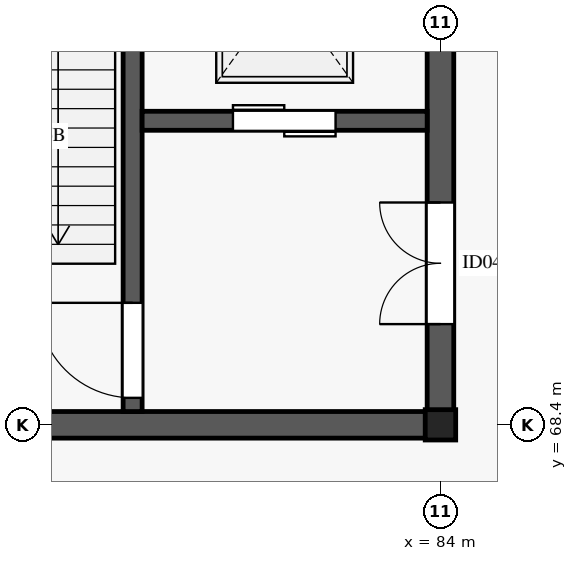
"""IFC4 building model, lengths in metres.
Left out: names, types, materials, properties, quantities, classifications, styles, units other than length and angle.
Written with IfcOpenShell. Run it as: python <this file> out.ifc"""

import sys

from ifc_helpers import new_model, si_unit, direction, frame, frame_2d, origin, origin_2d, place, context, subcontext, project, spatial, rectangle, i_section, extrude, element, fill, save


model = new_model("IFC4")
c1 = context("Model", 3, precision=1e-05, world=origin(), true_north=direction((0.0, 1.0)))
c2 = subcontext(c1, "Body", "Model", "MODEL_VIEW")
j1 = project(units=[si_unit("LENGTHUNIT", "METRE"), si_unit("PLANEANGLEUNIT", "RADIAN")], contexts=[c1])
p1 = place(None, origin())
s1 = spatial("IfcSite", under=j1, at=p1, CompositionType="ELEMENT")
p2 = place(p1, origin())
s2 = spatial("IfcBuilding", under=s1, at=p2, CompositionType="ELEMENT")
p3 = place(p2, frame((0.0, 0.0, -4.8)))
s3 = spatial("IfcBuildingStorey", under=s2, at=p3, CompositionType="ELEMENT", Elevation=-4.8)
p4 = place(p3, frame((84.0, 68.4, 0.0), z_axis=(0.0, 0.0, 1.0), x_axis=(1.0, 0.0, 0.0)))
e1 = element("IfcColumn", 1, at=p4, inside=s3, PredefinedType="COLUMN", context=c2, shape_type="SweptSolid", body=[
    extrude(i_section(OverallWidth=0.401, OverallDepth=0.399, WebThickness=0.025, FlangeThickness=0.04, FilletRadius=0.015, at=origin_2d()), origin(), (0.0, 0.0, 1.0), 4.58),
])
p5 = place(p3, frame((75.825, 68.4, 0.0), z_axis=(0.0, 0.0, 1.0), x_axis=(1.0, 0.0, 0.0)))
e2 = element("IfcWall", 2, at=p5, inside=s3, PredefinedType="SHEAR", context=c2, shape_type="SweptSolid", body=[
    extrude(rectangle(XDim=8.35, YDim=0.35, at=frame_2d((4.175, 0.0))), origin(), (0.0, 0.0, 1.0), 4.59),
])
p6 = place(p3, frame((84.0, 68.575, 0.0), z_axis=(0.0, 0.0, 1.0), x_axis=(0.0, 1.0, 0.0)))
e3 = element("IfcWall", 3, at=p6, inside=s3, PredefinedType="SHEAR", context=c2, shape_type="SweptSolid", body=[
    extrude(rectangle(XDim=7.25, YDim=0.35, at=frame_2d((3.625, 0.0))), origin(), (0.0, 0.0, 1.0), 4.59),
])
p7 = place(p6, frame((1.15, 0.0, 0.0)))
e4 = element("IfcOpeningElement", 4, at=p7, cuts=e3, PredefinedType="OPENING", context=c2, shape_type="SweptSolid", body=[
    extrude(rectangle(XDim=1.6, YDim=2.35, at=frame_2d((0.8, 1.175))), frame((0.0, 0.185, 0.0), z_axis=(0.0, -1.0, 0.0), x_axis=(1.0, 0.0, 0.0)), (0.0, 0.0, 1.0), 0.37),
])
p8 = place(p3, frame((79.95, 68.575, 0.0), z_axis=(0.0, 0.0, 1.0), x_axis=(0.0, 1.0, 0.0)))
e5 = element("IfcWall", 5, at=p8, inside=s3, PredefinedType="SHEAR", context=c2, shape_type="SweptSolid", body=[
    extrude(rectangle(XDim=7.25, YDim=0.25, at=frame_2d((3.625, 0.0))), origin(), (0.0, 0.0, 1.0), 4.59),
])
p9 = place(p8, frame((0.18, 0.0, 0.0)))
e6 = element("IfcOpeningElement", 6, at=p9, cuts=e5, PredefinedType="OPENING", context=c2, shape_type="SweptSolid", body=[
    extrude(rectangle(XDim=1.25, YDim=2.2, at=frame_2d((0.625, 1.1))), frame((0.0, 0.135, 0.0), z_axis=(0.0, -1.0, 0.0), x_axis=(1.0, 0.0, 0.0)), (0.0, 0.0, 1.0), 0.27),
])
p10 = place(p3, frame((80.075, 72.4, 0.0), z_axis=(0.0, 0.0, 1.0), x_axis=(1.0, 0.0, 0.0)))
e7 = element("IfcWall", 7, at=p10, inside=s3, PredefinedType="SHEAR", context=c2, shape_type="SweptSolid", body=[
    extrude(rectangle(XDim=3.75, YDim=0.25, at=frame_2d((1.875, 0.0))), origin(), (0.0, 0.0, 1.0), 4.59),
])
p11 = place(p10, frame((1.195, 0.0, 0.0)))
e8 = element("IfcOpeningElement", 8, at=p11, cuts=e7, PredefinedType="OPENING", context=c2, shape_type="SweptSolid", body=[
    extrude(rectangle(XDim=1.35, YDim=2.2, at=frame_2d((0.675, 1.1))), frame((0.0, 0.135, 0.0), z_axis=(0.0, -1.0, 0.0), x_axis=(1.0, 0.0, 0.0)), (0.0, 0.0, 1.0), 0.27),
])
p12 = place(p9, origin())
e9 = element("IfcDoor", 9, at=p12, inside=s3, OperationType="SINGLE_SWING_RIGHT", PredefinedType="DOOR", context=c2, shape_type="SweptSolid", body=[
    extrude(rectangle(XDim=1.25, YDim=2.2, at=frame_2d((0.625, 1.1))), frame((0.0, 0.025, 0.0), z_axis=(0.0, -1.0, 0.0), x_axis=(1.0, 0.0, 0.0)), (0.0, 0.0, 1.0), 0.05),
])
fill(e6, e9)
p13 = place(p7, origin())
e10 = element("IfcDoor", 10, at=p13, inside=s3, OperationType="DOUBLE_DOOR_SINGLE_SWING", PredefinedType="DOOR", context=c2, shape_type="SweptSolid", body=[
    extrude(rectangle(XDim=1.6, YDim=2.35, at=frame_2d((0.8, 1.175))), frame((0.0, 0.025, 0.0), z_axis=(0.0, -1.0, 0.0), x_axis=(1.0, 0.0, 0.0)), (0.0, 0.0, 1.0), 0.05),
])
fill(e4, e10)
p14 = place(p11, origin())
e11 = element("IfcDoor", 11, at=p14, inside=s3, OperationType="DOUBLE_DOOR_SLIDING", PredefinedType="DOOR", context=c2, shape_type="SweptSolid", body=[
    extrude(rectangle(XDim=1.35, YDim=2.2, at=frame_2d((0.675, 1.1))), frame((0.0, 0.025, 0.0), z_axis=(0.0, -1.0, 0.0), x_axis=(1.0, 0.0, 0.0)), (0.0, 0.0, 1.0), 0.05),
])
fill(e8, e11)
save(model, sys.argv[1])
